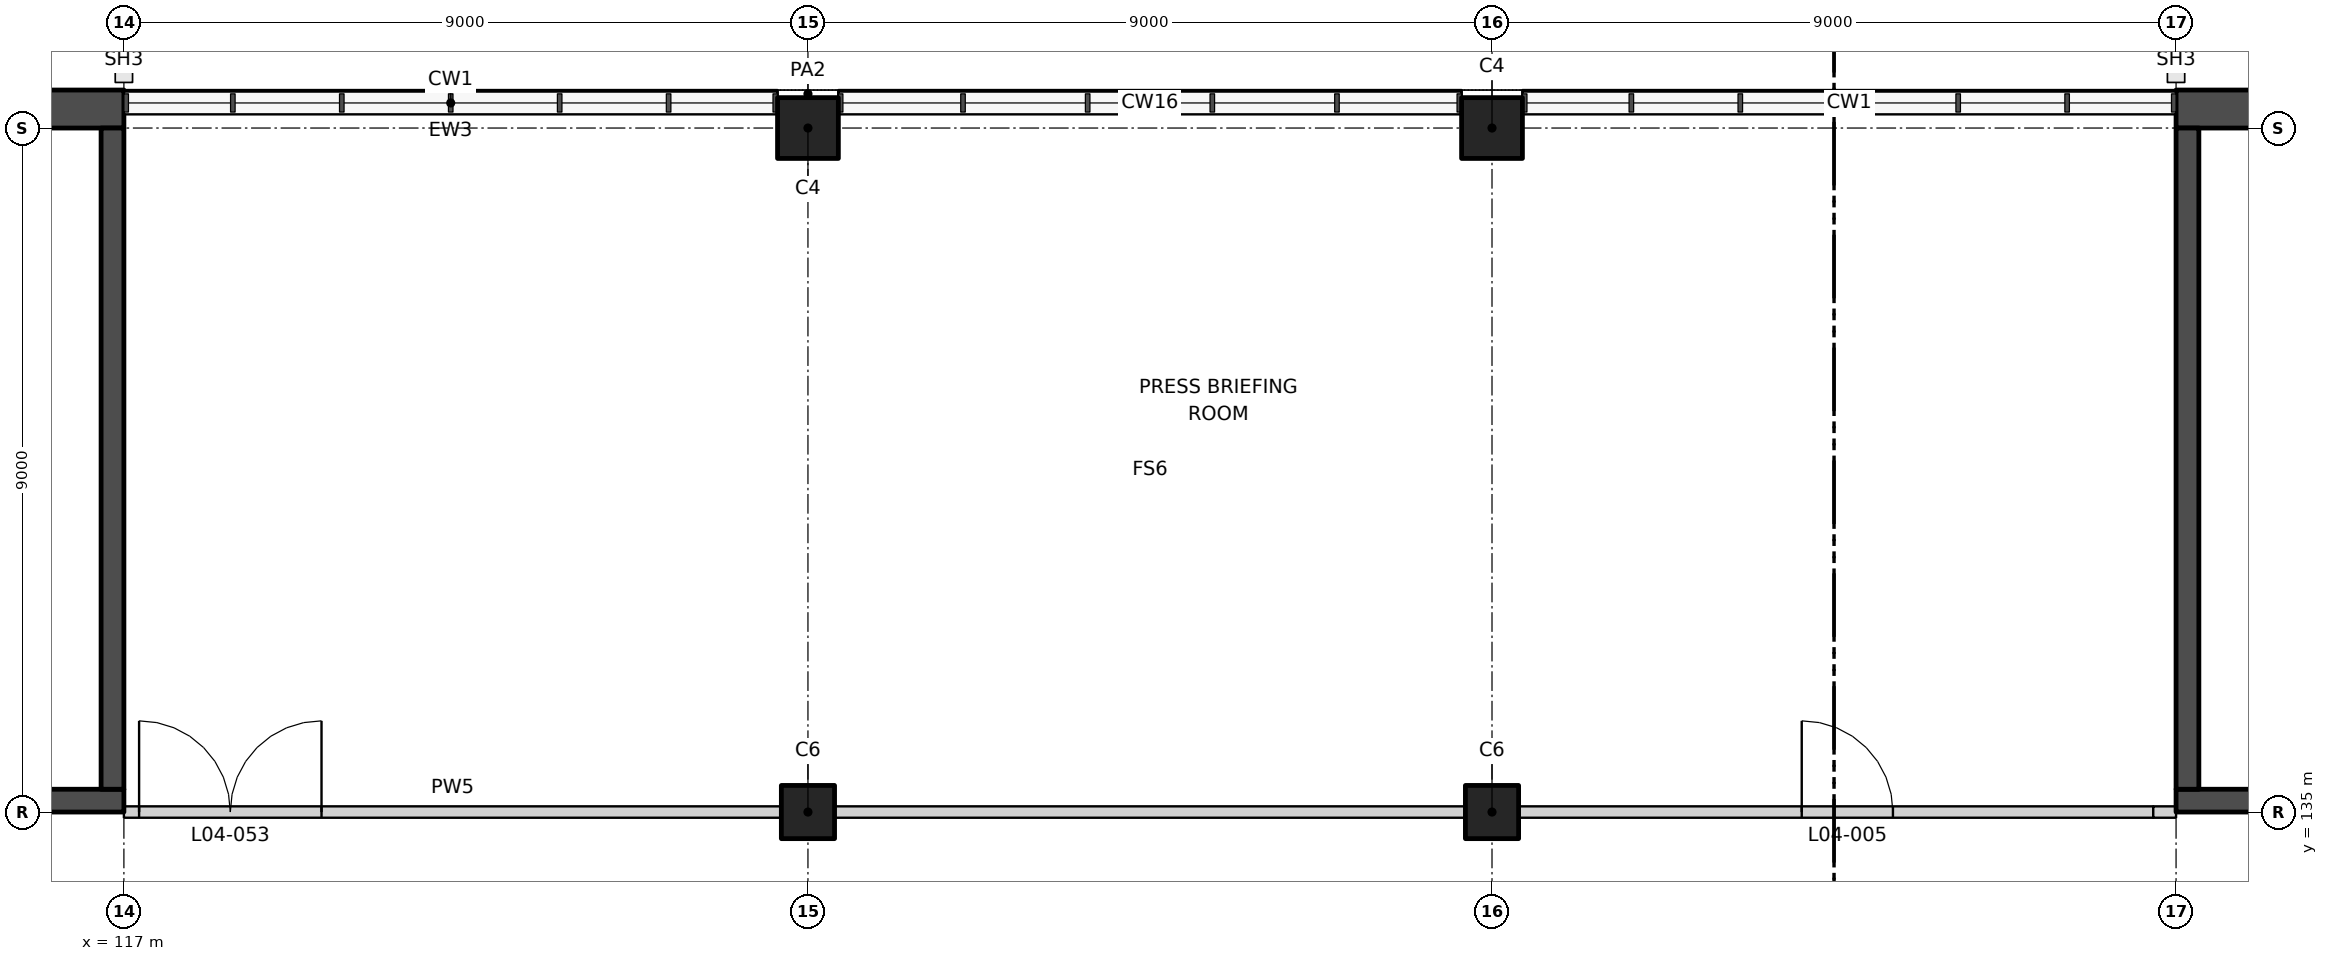
"""IFC4 building model, lengths in metres.
Left out: names, types, materials, properties, quantities, classifications, styles, units other than length and angle.
Written with IfcOpenShell. Run it as: python <this file> out.ifc"""

import sys

from ifc_helpers import new_model, si_unit, direction, frame, frame_2d, origin, origin_2d, place, context, subcontext, project, spatial, rectangle, extrude, element, fill, save


model = new_model("IFC4")
c1 = context("Model", 3, precision=1e-05, world=origin(), true_north=direction((0.0, 1.0)))
c2 = subcontext(c1, "Body", "Model", "MODEL_VIEW")
j1 = project(units=[si_unit("LENGTHUNIT", "METRE"), si_unit("PLANEANGLEUNIT", "RADIAN")], contexts=[c1])
p1 = place(None, origin())
s1 = spatial("IfcSite", under=j1, at=p1, CompositionType="ELEMENT")
p2 = place(p1, origin())
s2 = spatial("IfcBuilding", under=s1, at=p2, CompositionType="ELEMENT")
p3 = place(p2, frame((0.0, 0.0, 28.0)))
s3 = spatial("IfcBuildingStorey", under=s2, at=p3, CompositionType="ELEMENT", Elevation=28.0)
for number, where, z_axis, x_axis in (
    (1, (126.0, 144.0, 0.0), (0.0, 0.0, 1.0), (1.0, 0.0, 0.0)),
    (2, (135.0, 144.0, 0.0), (0.0, 0.0, 1.0), (1.0, 0.0, 0.0)),
):
    element("IfcColumn", number, at=place(p3, frame(where, z_axis=z_axis, x_axis=x_axis)), inside=s3, PredefinedType="COLUMN", context=c2, shape_type="SweptSolid", body=[
        extrude(rectangle(XDim=0.8, YDim=0.8, at=origin_2d()), origin(), (0.0, 0.0, 1.0), 5.5),
    ])
for number, where, z_axis, x_axis in (
    (3, (126.0, 135.0, 0.0), (0.0, 0.0, 1.0), (1.0, 0.0, 0.0)),
    (4, (135.0, 135.0, 0.0), (0.0, 0.0, 1.0), (1.0, 0.0, 0.0)),
):
    element("IfcColumn", number, at=place(p3, frame(where, z_axis=z_axis, x_axis=x_axis)), inside=s3, PredefinedType="COLUMN", context=c2, shape_type="SweptSolid", body=[
        extrude(rectangle(XDim=0.7, YDim=0.7, at=origin_2d()), origin(), (0.0, 0.0, 1.0), 5.5),
    ])
p4 = place(p3, frame((135.35, 135.0, 0.0), z_axis=(0.0, 0.0, 1.0), x_axis=(1.0, 0.0, 0.0)))
e5 = element("IfcWall", 5, at=p4, inside=s3, PredefinedType="PARTITIONING", context=c2, shape_type="SweptSolid", body=[
    extrude(rectangle(XDim=8.35, YDim=0.15, at=frame_2d((4.175, 0.0))), origin(), (0.0, 0.0, 1.0), 4.2),
])
p5 = place(p4, frame((3.725, 0.0, 0.0)))
e6 = element("IfcOpeningElement", 6, at=p5, cuts=e5, PredefinedType="OPENING", context=c2, shape_type="SweptSolid", body=[
    extrude(rectangle(XDim=1.2, YDim=2.1, at=frame_2d((0.6, 1.05))), frame((0.0, 0.085, 0.0), z_axis=(0.0, -1.0, 0.0), x_axis=(1.0, 0.0, 0.0)), (0.0, 0.0, 1.0), 0.17),
])
p6 = place(p3, frame((126.35, 135.0, 0.0), z_axis=(0.0, 0.0, 1.0), x_axis=(1.0, 0.0, 0.0)))
e7 = element("IfcWall", 7, at=p6, inside=s3, PredefinedType="PARTITIONING", context=c2, shape_type="SweptSolid", body=[
    extrude(rectangle(XDim=8.3, YDim=0.15, at=frame_2d((4.15, 0.0))), origin(), (0.0, 0.0, 1.0), 4.2),
])
p7 = place(p3, frame((117.0, 135.0, 0.0), z_axis=(0.0, 0.0, 1.0), x_axis=(1.0, 0.0, 0.0)))
e8 = element("IfcWall", 8, at=p7, inside=s3, PredefinedType="PARTITIONING", context=c2, shape_type="SweptSolid", body=[
    extrude(rectangle(XDim=8.65, YDim=0.15, at=frame_2d((4.325, 0.0))), origin(), (0.0, 0.0, 1.0), 4.2),
])
p8 = place(p7, frame((0.2, 0.0, 0.0)))
e9 = element("IfcOpeningElement", 9, at=p8, cuts=e8, PredefinedType="OPENING", context=c2, shape_type="SweptSolid", body=[
    extrude(rectangle(XDim=2.4, YDim=2.4, at=frame_2d((1.2, 1.2))), frame((0.0, 0.085, 0.0), z_axis=(0.0, -1.0, 0.0), x_axis=(1.0, 0.0, 0.0)), (0.0, 0.0, 1.0), 0.17),
])
p9 = place(p3, frame((125.6, 144.35, 0.0), z_axis=(0.0, 0.0, 1.0), x_axis=(-1.0, 0.0, 0.0)))
e10 = element("IfcWall", 10, at=p9, inside=s3, PredefinedType="SOLIDWALL", context=c2, shape_type="SweptSolid", body=[
    extrude(rectangle(XDim=8.6, YDim=0.3, at=frame_2d((4.3, 0.0))), origin(), (0.0, 0.0, 1.0), 1.0),
])
p10 = place(p3, frame((134.6, 144.35, 0.0), z_axis=(0.0, 0.0, 1.0), x_axis=(-1.0, 0.0, 0.0)))
e11 = element("IfcWall", 11, at=p10, inside=s3, PredefinedType="SOLIDWALL", context=c2, shape_type="SweptSolid", body=[
    extrude(rectangle(XDim=8.2, YDim=0.3, at=frame_2d((4.1, 0.0))), origin(), (0.0, 0.0, 1.0), 1.0),
])
p11 = place(p3, frame((144.0, 144.35, 0.0), z_axis=(0.0, 0.0, 1.0), x_axis=(-1.0, 0.0, 0.0)))
e12 = element("IfcWall", 12, at=p11, inside=s3, PredefinedType="SOLIDWALL", context=c2, shape_type="SweptSolid", body=[
    extrude(rectangle(XDim=8.6, YDim=0.3, at=frame_2d((4.3, 0.0))), origin(), (0.0, 0.0, 1.0), 1.0),
])
p12 = place(p3, frame((117.0, 135.15, 0.0), z_axis=(0.0, 0.0, 1.0), x_axis=(-1.0, 0.0, 0.0)))
e13 = element("IfcWall", 13, at=p12, inside=s3, PredefinedType="SHEAR", context=c2, shape_type="SweptSolid", body=[
    extrude(rectangle(XDim=18.0, YDim=0.3, at=frame_2d((9.0, 0.0))), origin(), (0.0, 0.0, 1.0), 5.5),
])
p13 = place(p12, frame((1.5, 0.0, 0.0)))
e14 = element("IfcOpeningElement", 14, at=p13, cuts=e13, PredefinedType="OPENING", context=c2, shape_type="SweptSolid", body=[
    extrude(rectangle(XDim=1.2, YDim=2.1, at=frame_2d((0.6, 1.05))), frame((0.0, 0.16, 0.0), z_axis=(0.0, -1.0, 0.0), x_axis=(1.0, 0.0, 0.0)), (0.0, 0.0, 1.0), 0.32),
])
p14 = place(p3, frame((117.0, 144.25, 0.0), z_axis=(0.0, 0.0, 1.0), x_axis=(-1.0, 0.0, 0.0)))
e15 = element("IfcWall", 15, at=p14, inside=s3, PredefinedType="SHEAR", context=c2, shape_type="SweptSolid", body=[
    extrude(rectangle(XDim=18.0, YDim=0.5, at=frame_2d((9.0, 0.0))), origin(), (0.0, 0.0, 1.0), 5.5),
])
p15 = place(p3, frame((116.85, 135.3, 0.0), z_axis=(0.0, 0.0, 1.0), x_axis=(0.0, 1.0, 0.0)))
e16 = element("IfcWall", 16, at=p15, inside=s3, PredefinedType="SHEAR", context=c2, shape_type="SweptSolid", body=[
    extrude(rectangle(XDim=8.7, YDim=0.3, at=frame_2d((4.35, 0.0))), origin(), (0.0, 0.0, 1.0), 5.5),
])
p16 = place(p3, frame((144.0, 135.15, 0.0), z_axis=(0.0, 0.0, 1.0), x_axis=(1.0, 0.0, 0.0)))
e17 = element("IfcWall", 17, at=p16, inside=s3, PredefinedType="SHEAR", context=c2, shape_type="SweptSolid", body=[
    extrude(rectangle(XDim=18.0, YDim=0.3, at=frame_2d((9.0, 0.0))), origin(), (0.0, 0.0, 1.0), 5.5),
])
p17 = place(p16, frame((1.5, 0.0, 0.0)))
e18 = element("IfcOpeningElement", 18, at=p17, cuts=e17, PredefinedType="OPENING", context=c2, shape_type="SweptSolid", body=[
    extrude(rectangle(XDim=1.2, YDim=2.1, at=frame_2d((0.6, 1.05))), frame((0.0, 0.16, 0.0), z_axis=(0.0, -1.0, 0.0), x_axis=(1.0, 0.0, 0.0)), (0.0, 0.0, 1.0), 0.32),
])
p18 = place(p3, frame((144.0, 144.25, 0.0), z_axis=(0.0, 0.0, 1.0), x_axis=(1.0, 0.0, 0.0)))
e19 = element("IfcWall", 19, at=p18, inside=s3, PredefinedType="SHEAR", context=c2, shape_type="SweptSolid", body=[
    extrude(rectangle(XDim=18.0, YDim=0.5, at=frame_2d((9.0, 0.0))), origin(), (0.0, 0.0, 1.0), 5.5),
])
p19 = place(p3, frame((144.15, 135.3, 0.0), z_axis=(0.0, 0.0, 1.0), x_axis=(0.0, 1.0, 0.0)))
e20 = element("IfcWall", 20, at=p19, inside=s3, PredefinedType="SHEAR", context=c2, shape_type="SweptSolid", body=[
    extrude(rectangle(XDim=8.7, YDim=0.3, at=frame_2d((4.35, 0.0))), origin(), (0.0, 0.0, 1.0), 5.5),
])
p20 = place(p3, frame((143.7, 135.0, 0.0), z_axis=(0.0, 0.0, 1.0), x_axis=(1.0, 0.0, 0.0)))
e21 = element("IfcWall", 21, at=p20, inside=s3, PredefinedType="PARTITIONING", context=c2, shape_type="SweptSolid", body=[
    extrude(rectangle(XDim=0.3, YDim=0.15, at=frame_2d((0.15, 0.0))), origin(), (0.0, 0.0, 1.0), 5.5),
])
p21 = place(p5, origin())
e22 = element("IfcDoor", 22, at=p21, inside=s3, OperationType="SINGLE_SWING_LEFT", PredefinedType="DOOR", context=c2, shape_type="SweptSolid", body=[
    extrude(rectangle(XDim=1.2, YDim=2.1, at=frame_2d((0.6, 1.05))), frame((0.0, 0.025, 0.0), z_axis=(0.0, -1.0, 0.0), x_axis=(1.0, 0.0, 0.0)), (0.0, 0.0, 1.0), 0.05),
])
fill(e6, e22)
p22 = place(p8, origin())
e23 = element("IfcDoor", 23, at=p22, inside=s3, OperationType="DOUBLE_DOOR_DOUBLE_SWING", PredefinedType="DOOR", context=c2, shape_type="SweptSolid", body=[
    extrude(rectangle(XDim=2.4, YDim=2.4, at=frame_2d((1.2, 1.2))), frame((0.0, 0.025, 0.0), z_axis=(0.0, -1.0, 0.0), x_axis=(1.0, 0.0, 0.0)), (0.0, 0.0, 1.0), 0.05),
])
fill(e9, e23)
save(model, sys.argv[1])
